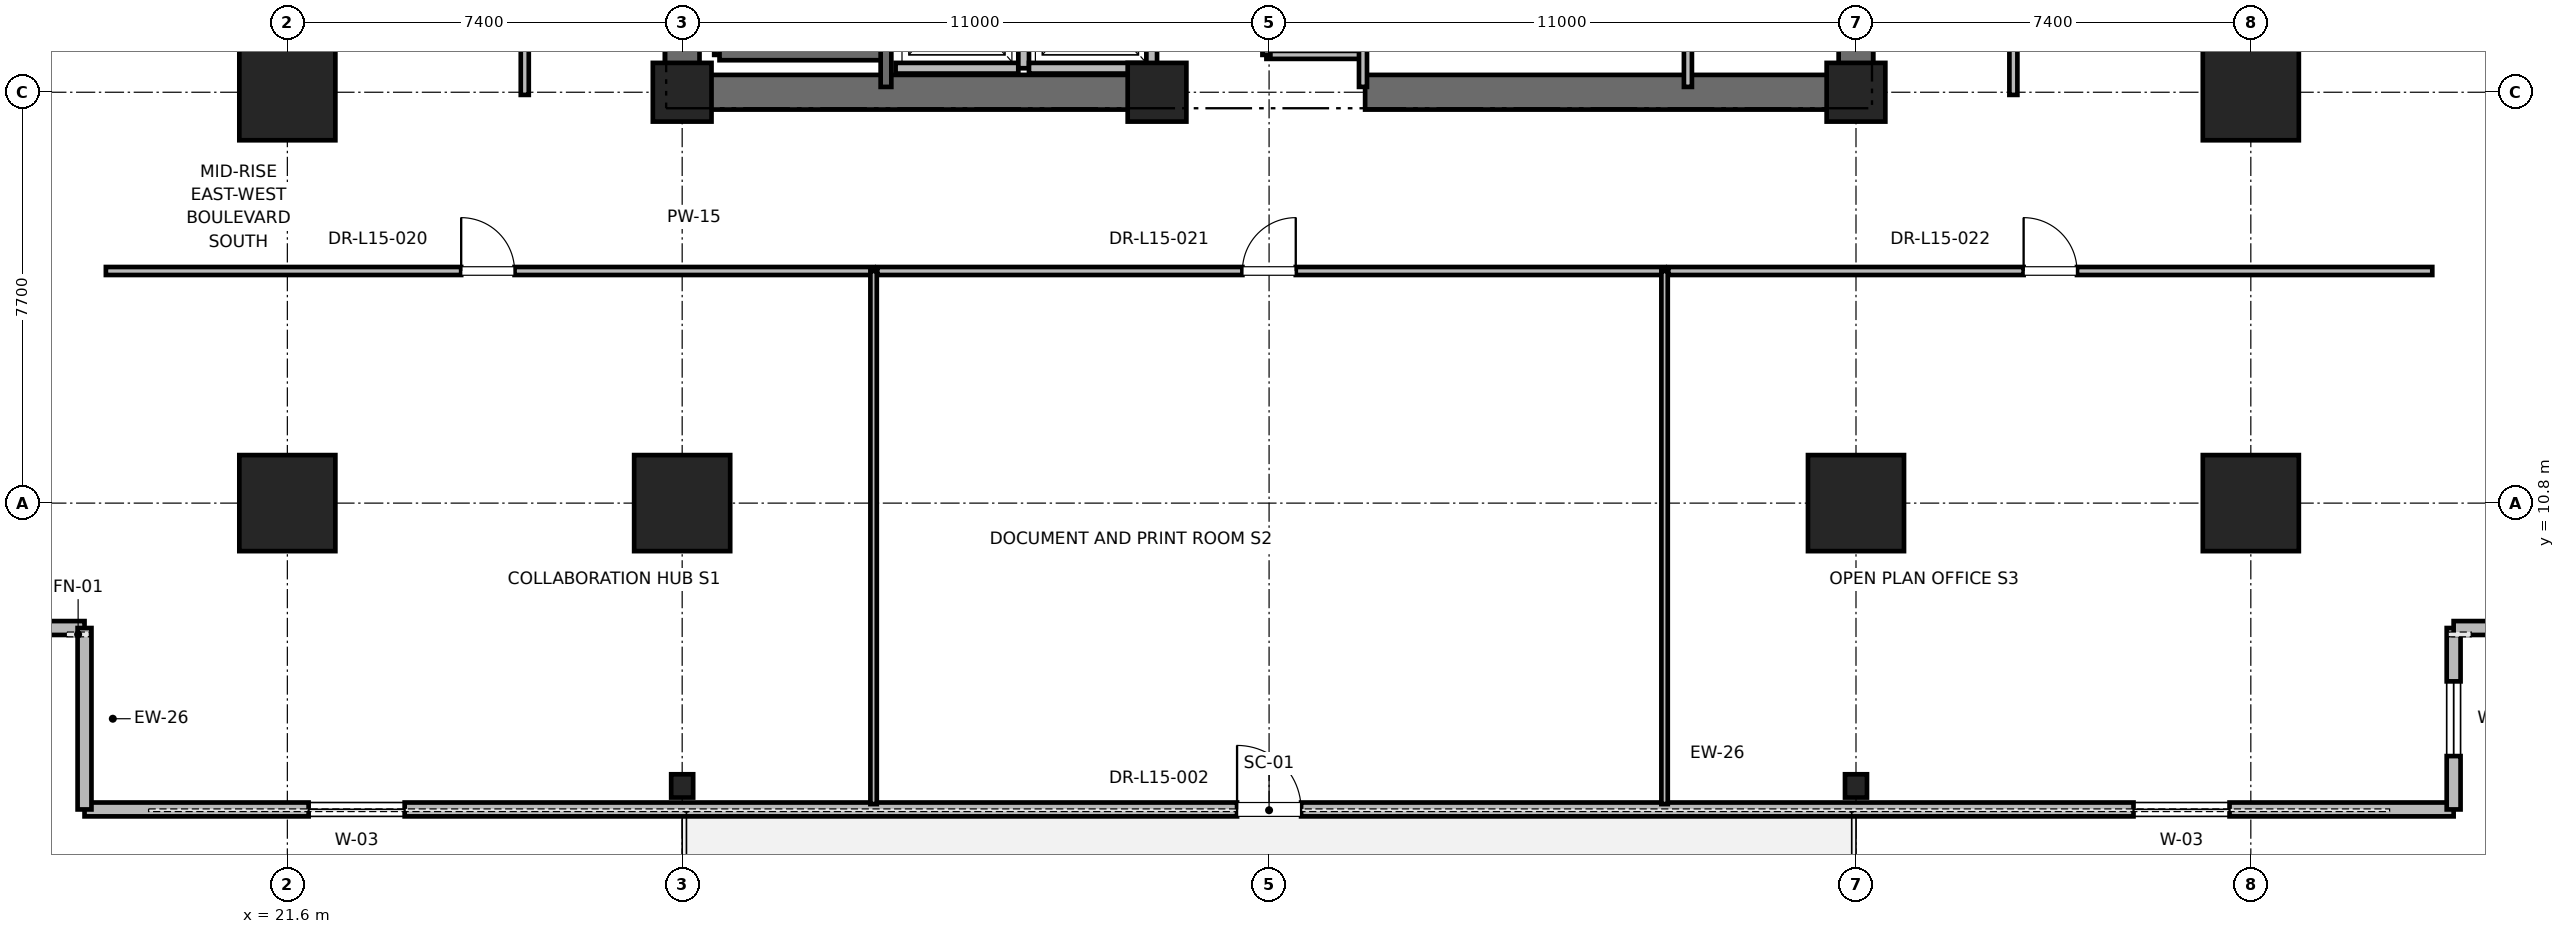
"""IFC4 building model, lengths in metres.
Left out: names, types, materials, properties, quantities, classifications, styles, units other than length and angle.
Written with IfcOpenShell. Run it as: python <this file> out.ifc"""

import sys

from ifc_helpers import new_model, si_unit, direction, frame, frame_2d, origin, origin_2d, place, context, subcontext, project, spatial, rectangle, i_section, extrude, element, fill, save


model = new_model("IFC4")
c1 = context("Model", 3, precision=1e-05, world=origin(), true_north=direction((0.0, 1.0)))
c2 = subcontext(c1, "Body", "Model", "MODEL_VIEW")
j1 = project(units=[si_unit("LENGTHUNIT", "METRE"), si_unit("PLANEANGLEUNIT", "RADIAN")], contexts=[c1])
p1 = place(None, origin())
s1 = spatial("IfcSite", under=j1, at=p1, CompositionType="ELEMENT")
p2 = place(p1, origin())
s2 = spatial("IfcBuilding", under=s1, at=p2, CompositionType="ELEMENT")
p3 = place(p2, frame((0.0, 0.0, 67.6)))
s3 = spatial("IfcBuildingStorey", under=s2, at=p3, CompositionType="ELEMENT", Elevation=67.6)
for number, where, z_axis, x_axis in (
    (1, (29.0, 10.8, 0.0), (0.0, 0.0, 1.0), (1.0, 0.0, 0.0)),
    (2, (51.0, 10.8, 0.0), (0.0, 0.0, 1.0), (1.0, 0.0, 0.0)),
    (3, (21.6, 18.5, 0.0), (0.0, 0.0, 1.0), (1.0, 0.0, 0.0)),
    (4, (58.4, 18.5, 0.0), (0.0, 0.0, 1.0), (1.0, 0.0, 0.0)),
    (5, (21.6, 10.8, 0.0), (0.0, 0.0, 1.0), (1.0, 0.0, 0.0)),
    (6, (58.4, 10.8, 0.0), (0.0, 0.0, 1.0), (1.0, 0.0, 0.0)),
):
    element("IfcColumn", number, at=place(p3, frame(where, z_axis=z_axis, x_axis=x_axis)), inside=s3, PredefinedType="COLUMN", context=c2, shape_type="SweptSolid", body=[
        extrude(rectangle(XDim=1.8, YDim=1.8, at=origin_2d()), origin(), (0.0, 0.0, 1.0), 4.0),
    ])
for number, where, z_axis, x_axis in (
    (7, (29.0, 5.5, 0.0), (0.0, 0.0, 1.0), (1.0, 0.0, 0.0)),
    (8, (51.0, 5.5, 0.0), (0.0, 0.0, 1.0), (1.0, 0.0, 0.0)),
):
    element("IfcColumn", number, at=place(p3, frame(where, z_axis=z_axis, x_axis=x_axis)), inside=s3, PredefinedType="COLUMN", context=c2, shape_type="SweptSolid", body=[
        extrude(i_section(OverallWidth=0.412, OverallDepth=0.437, WebThickness=0.036, FlangeThickness=0.058, FilletRadius=0.015, at=origin_2d()), origin(), (0.0, 0.0, 1.0), 4.0),
    ])
for number, where, z_axis, x_axis in (
    (9, (29.0, 18.5, 0.0), (0.0, 0.0, 1.0), (1.0, 0.0, 0.0)),
    (10, (51.0, 18.5, 0.0), (0.0, 0.0, 1.0), (1.0, 0.0, 0.0)),
    (11, (37.9, 18.5, 0.0), (0.0, 0.0, 1.0), (1.0, 0.0, 0.0)),
):
    element("IfcColumn", number, at=place(p3, frame(where, z_axis=z_axis, x_axis=x_axis)), inside=s3, PredefinedType="PILASTER", context=c2, shape_type="SweptSolid", body=[
        extrude(rectangle(XDim=1.1, YDim=1.1, at=origin_2d()), origin(), (0.0, 0.0, 1.0), 4.0),
    ])
for number, where, z_axis, x_axis in (
    (12, (29.0, 18.5, 0.0), (0.0, 0.0, 1.0), (1.0, 0.0, 0.0)),
    (13, (41.8, 18.5, 0.0), (0.0, 0.0, 1.0), (1.0, 0.0, 0.0)),
):
    element("IfcWall", number, at=place(p3, frame(where, z_axis=z_axis, x_axis=x_axis)), inside=s3, PredefinedType="SHEAR", context=c2, shape_type="SweptSolid", body=[
        extrude(rectangle(XDim=9.2, YDim=0.65, at=frame_2d((4.6, 0.0))), origin(), (0.0, 0.0, 1.0), 3.76),
    ])
p4 = place(p3, frame((29.0, 18.5, 0.0), z_axis=(0.0, 0.0, 1.0), x_axis=(0.0, 1.0, 0.0)))
e14 = element("IfcWall", 14, at=p4, inside=s3, PredefinedType="SHEAR", context=c2, shape_type="SweptSolid", body=[
    extrude(rectangle(XDim=8.8, YDim=0.65, at=frame_2d((4.4, 0.0))), origin(), (0.0, 0.0, 1.0), 3.76),
])
p5 = place(p3, frame((51.0, 18.5, 0.0), z_axis=(0.0, 0.0, 1.0), x_axis=(0.0, 1.0, 0.0)))
e15 = element("IfcWall", 15, at=p5, inside=s3, PredefinedType="SHEAR", context=c2, shape_type="SweptSolid", body=[
    extrude(rectangle(XDim=5.8, YDim=0.65, at=frame_2d((2.9, 0.0))), origin(), (0.0, 0.0, 1.0), 3.76),
])
p6 = place(p3, frame((17.799, 5.059, 0.0), z_axis=(0.0, 0.0, 1.0), x_axis=(1.0, 0.0, 0.0)))
e16 = element("IfcWall", 16, at=p6, inside=s3, PredefinedType="PARAPET", context=c2, shape_type="SweptSolid", body=[
    extrude(rectangle(XDim=44.402, YDim=0.26, at=frame_2d((22.201, 0.0))), origin(), (0.0, 0.0, 1.0), 2.889),
])
p7 = place(p6, frame((4.2, 0.0, 0.85)))
e17 = element("IfcOpeningElement", 17, at=p7, cuts=e16, PredefinedType="OPENING", context=c2, shape_type="SweptSolid", body=[
    extrude(rectangle(XDim=1.8, YDim=2.2, at=frame_2d((0.9, 1.1))), frame((0.0, 0.13, 0.0), z_axis=(0.0, -1.0, 0.0), x_axis=(1.0, 0.0, 0.0)), (0.0, 0.0, 1.0), 0.26),
])
p8 = place(p6, frame((21.601, 0.0, 0.0)))
e18 = element("IfcOpeningElement", 18, at=p8, cuts=e16, PredefinedType="OPENING", context=c2, shape_type="SweptSolid", body=[
    extrude(rectangle(XDim=1.2, YDim=2.2, at=frame_2d((0.6, 1.1))), frame((0.0, 0.13, 0.0), z_axis=(0.0, -1.0, 0.0), x_axis=(1.0, 0.0, 0.0)), (0.0, 0.0, 1.0), 0.26),
])
p9 = place(p6, frame((38.402, 0.0, 0.85)))
e19 = element("IfcOpeningElement", 19, at=p9, cuts=e16, PredefinedType="OPENING", context=c2, shape_type="SweptSolid", body=[
    extrude(rectangle(XDim=1.8, YDim=2.2, at=frame_2d((0.9, 1.1))), frame((0.0, 0.13, 0.0), z_axis=(0.0, -1.0, 0.0), x_axis=(1.0, 0.0, 0.0)), (0.0, 0.0, 1.0), 0.26),
])
p10 = place(p3, frame((13.999, 8.459, 0.0), z_axis=(0.0, 0.0, 1.0), x_axis=(1.0, 0.0, 0.0)))
e20 = element("IfcWall", 20, at=p10, inside=s3, PredefinedType="PARAPET", context=c2, shape_type="SweptSolid", body=[
    extrude(rectangle(XDim=3.8, YDim=0.26, at=frame_2d((1.9, 0.0))), origin(), (0.0, 0.0, 1.0), 3.76),
])
p11 = place(p10, frame((1.2, 0.0, 0.85)))
e21 = element("IfcOpeningElement", 21, at=p11, cuts=e20, PredefinedType="OPENING", context=c2, shape_type="SweptSolid", body=[
    extrude(rectangle(XDim=1.4, YDim=2.0, at=frame_2d((0.7, 1.0))), frame((0.0, 0.13, 0.0), z_axis=(0.0, -1.0, 0.0), x_axis=(1.0, 0.0, 0.0)), (0.0, 0.0, 1.0), 0.26),
])
p12 = place(p3, frame((17.799, 8.459, 0.0), z_axis=(0.0, 0.0, 1.0), x_axis=(0.0, -1.0, 0.0)))
e22 = element("IfcWall", 22, at=p12, inside=s3, PredefinedType="PARAPET", context=c2, shape_type="SweptSolid", body=[
    extrude(rectangle(XDim=3.4, YDim=0.26, at=frame_2d((1.7, 0.0))), origin(), (0.0, 0.0, 1.0), 3.76),
])
p13 = place(p3, frame((62.201, 5.059, 0.0), z_axis=(0.0, 0.0, 1.0), x_axis=(0.0, 1.0, 0.0)))
e23 = element("IfcWall", 23, at=p13, inside=s3, PredefinedType="PARAPET", context=c2, shape_type="SweptSolid", body=[
    extrude(rectangle(XDim=3.4, YDim=0.26, at=frame_2d((1.7, 0.0))), origin(), (0.0, 0.0, 1.0), 3.76),
])
p14 = place(p13, frame((1.0, 0.0, 0.85)))
e24 = element("IfcOpeningElement", 24, at=p14, cuts=e23, PredefinedType="OPENING", context=c2, shape_type="SweptSolid", body=[
    extrude(rectangle(XDim=1.4, YDim=2.0, at=frame_2d((0.7, 1.0))), frame((0.0, 0.13, 0.0), z_axis=(0.0, -1.0, 0.0), x_axis=(1.0, 0.0, 0.0)), (0.0, 0.0, 1.0), 0.26),
])
p15 = place(p3, frame((62.201, 8.459, 0.0), z_axis=(0.0, 0.0, 1.0), x_axis=(1.0, 0.0, 0.0)))
e25 = element("IfcWall", 25, at=p15, inside=s3, PredefinedType="PARAPET", context=c2, shape_type="SweptSolid", body=[
    extrude(rectangle(XDim=3.8, YDim=0.26, at=frame_2d((1.9, 0.0))), origin(), (0.0, 0.0, 1.0), 3.76),
])
p16 = place(p3, frame((29.7, 19.2, 0.0), z_axis=(0.0, 0.0, 1.0), x_axis=(0.0, 1.0, 0.0)))
e26 = element("IfcWall", 26, at=p16, inside=s3, PredefinedType="SOLIDWALL", context=c2, shape_type="SweptSolid", body=[
    extrude(rectangle(XDim=8.15, YDim=0.2, at=frame_2d((4.075, 0.0))), origin(), (0.0, 0.0, 1.0), 3.76),
])
p17 = place(p3, frame((29.7, 19.2, 0.0), z_axis=(0.0, 0.0, 1.0), x_axis=(1.0, 0.0, 0.0)))
e27 = element("IfcWall", 27, at=p17, inside=s3, PredefinedType="SOLIDWALL", context=c2, shape_type="SweptSolid", body=[
    extrude(rectangle(XDim=3.12, YDim=0.2, at=frame_2d((1.56, 0.0))), origin(), (0.0, 0.0, 1.0), 3.76),
])
p18 = place(p3, frame((32.82, 18.6, 0.0), z_axis=(0.0, 0.0, 1.0), x_axis=(0.0, 1.0, 0.0)))
e28 = element("IfcWall", 28, at=p18, inside=s3, PredefinedType="SOLIDWALL", context=c2, shape_type="SweptSolid", body=[
    extrude(rectangle(XDim=8.78, YDim=0.2, at=frame_2d((4.39, 0.0))), origin(), (0.0, 0.0, 1.0), 3.76),
])
p19 = place(p3, frame((33.0, 18.95, 0.0), z_axis=(0.0, 0.0, 1.0), x_axis=(1.0, 0.0, 0.0)))
e29 = element("IfcWall", 29, at=p19, inside=s3, PredefinedType="SOLIDWALL", context=c2, shape_type="SweptSolid", body=[
    extrude(rectangle(XDim=2.3, YDim=0.2, at=frame_2d((1.15, 0.0))), origin(), (0.0, 0.0, 1.0), 3.76),
])
p20 = place(p3, frame((35.4, 18.95, 0.0), z_axis=(0.0, 0.0, 1.0), x_axis=(0.0, 1.0, 0.0)))
e30 = element("IfcWall", 30, at=p20, inside=s3, PredefinedType="SOLIDWALL", context=c2, shape_type="SweptSolid", body=[
    extrude(rectangle(XDim=2.6, YDim=0.2, at=frame_2d((1.3, 0.0))), origin(), (0.0, 0.0, 1.0), 3.76),
])
p21 = place(p3, frame((35.5, 18.95, 0.0), z_axis=(0.0, 0.0, 1.0), x_axis=(1.0, 0.0, 0.0)))
e31 = element("IfcWall", 31, at=p21, inside=s3, PredefinedType="SOLIDWALL", context=c2, shape_type="SweptSolid", body=[
    extrude(rectangle(XDim=2.3, YDim=0.2, at=frame_2d((1.15, 0.0))), origin(), (0.0, 0.0, 1.0), 2.54),
])
p22 = place(p3, frame((37.8, 18.95, 0.0), z_axis=(0.0, 0.0, 1.0), x_axis=(0.0, 1.0, 0.0)))
e32 = element("IfcWall", 32, at=p22, inside=s3, PredefinedType="SOLIDWALL", context=c2, shape_type="SweptSolid", body=[
    extrude(rectangle(XDim=2.6, YDim=0.2, at=frame_2d((1.3, 0.0))), origin(), (0.0, 0.0, 1.0), 2.54),
])
p23 = place(p3, frame((39.95, 19.2, 0.0), z_axis=(0.0, 0.0, 1.0), x_axis=(1.0, 0.0, 0.0)))
e33 = element("IfcWall", 33, at=p23, inside=s3, PredefinedType="PARTITIONING", context=c2, shape_type="SweptSolid", body=[
    extrude(rectangle(XDim=1.81, YDim=0.15, at=frame_2d((0.905, 0.0))), origin(), (0.0, 0.0, 1.0), 2.85),
])
p24 = place(p3, frame((41.76, 18.6, 0.0), z_axis=(0.0, 0.0, 1.0), x_axis=(0.0, 1.0, 0.0)))
e34 = element("IfcWall", 34, at=p24, inside=s3, PredefinedType="PARTITIONING", context=c2, shape_type="SweptSolid", body=[
    extrude(rectangle(XDim=3.6, YDim=0.15, at=frame_2d((1.8, 0.0))), origin(), (0.0, 0.0, 1.0), 2.54),
])
p25 = place(p3, frame((39.95, 19.2, 0.0), z_axis=(0.0, 0.0, 1.0), x_axis=(0.0, 1.0, 0.0)))
e35 = element("IfcWall", 35, at=p25, inside=s3, PredefinedType="PARTITIONING", context=c2, shape_type="SweptSolid", body=[
    extrude(rectangle(XDim=3.0, YDim=0.15, at=frame_2d((1.5, 0.0))), origin(), (0.0, 0.0, 1.0), 2.85),
])
p26 = place(p25, frame((1.05, 0.0, 0.0)))
e36 = element("IfcOpeningElement", 36, at=p26, cuts=e35, PredefinedType="OPENING", context=c2, shape_type="SweptSolid", body=[
    extrude(rectangle(XDim=0.9, YDim=2.1, at=frame_2d((0.45, 1.05))), frame((0.0, 0.075, 0.0), z_axis=(0.0, -1.0, 0.0), x_axis=(1.0, 0.0, 0.0)), (0.0, 0.0, 1.0), 0.15),
])
p27 = place(p3, frame((47.85, 18.6, 0.0), z_axis=(0.0, 0.0, 1.0), x_axis=(0.0, 1.0, 0.0)))
e37 = element("IfcWall", 37, at=p27, inside=s3, PredefinedType="PARTITIONING", context=c2, shape_type="SweptSolid", body=[
    extrude(rectangle(XDim=2.54, YDim=0.15, at=frame_2d((1.27, 0.0))), origin(), (0.0, 0.0, 1.0), 2.85),
])
p28 = place(p3, frame((18.199, 15.15, 0.0), z_axis=(0.0, 0.0, 1.0), x_axis=(1.0, 0.0, 0.0)))
e38 = element("IfcWall", 38, at=p28, inside=s3, PredefinedType="PARTITIONING", context=c2, shape_type="SweptSolid", body=[
    extrude(rectangle(XDim=14.389, YDim=0.15, at=frame_2d((7.194, 0.0))), origin(), (0.0, 0.0, 1.0), 2.85),
])
p29 = place(p28, frame((6.659, 0.0, 0.0)))
e39 = element("IfcOpeningElement", 39, at=p29, cuts=e38, PredefinedType="OPENING", context=c2, shape_type="SweptSolid", body=[
    extrude(rectangle(XDim=1.0, YDim=2.15, at=frame_2d((0.5, 1.075))), frame((0.0, 0.075, 0.0), z_axis=(0.0, -1.0, 0.0), x_axis=(1.0, 0.0, 0.0)), (0.0, 0.0, 1.0), 0.15),
])
p30 = place(p3, frame((32.588, 5.159, 0.0), z_axis=(0.0, 0.0, 1.0), x_axis=(0.0, 1.0, 0.0)))
e40 = element("IfcWall", 40, at=p30, inside=s3, PredefinedType="PARTITIONING", context=c2, shape_type="SweptSolid", body=[
    extrude(rectangle(XDim=9.991, YDim=0.12, at=frame_2d((4.995, 0.0))), origin(), (0.0, 0.0, 1.0), 2.39),
])
p31 = place(p3, frame((32.658, 15.15, 0.0), z_axis=(0.0, 0.0, 1.0), x_axis=(1.0, 0.0, 0.0)))
e41 = element("IfcWall", 41, at=p31, inside=s3, PredefinedType="PARTITIONING", context=c2, shape_type="SweptSolid", body=[
    extrude(rectangle(XDim=14.755, YDim=0.15, at=frame_2d((7.377, 0.0))), origin(), (0.0, 0.0, 1.0), 2.85),
])
p32 = place(p31, frame((6.842, 0.0, 0.0)))
e42 = element("IfcOpeningElement", 42, at=p32, cuts=e41, PredefinedType="OPENING", context=c2, shape_type="SweptSolid", body=[
    extrude(rectangle(XDim=1.0, YDim=2.15, at=frame_2d((0.5, 1.075))), frame((0.0, 0.075, 0.0), z_axis=(0.0, -1.0, 0.0), x_axis=(1.0, 0.0, 0.0)), (0.0, 0.0, 1.0), 0.15),
])
p33 = place(p3, frame((47.412, 5.159, 0.0), z_axis=(0.0, 0.0, 1.0), x_axis=(0.0, 1.0, 0.0)))
e43 = element("IfcWall", 43, at=p33, inside=s3, PredefinedType="PARTITIONING", context=c2, shape_type="SweptSolid", body=[
    extrude(rectangle(XDim=9.991, YDim=0.12, at=frame_2d((4.995, 0.0))), origin(), (0.0, 0.0, 1.0), 2.39),
])
p34 = place(p3, frame((47.482, 15.15, 0.0), z_axis=(0.0, 0.0, 1.0), x_axis=(1.0, 0.0, 0.0)))
e44 = element("IfcWall", 44, at=p34, inside=s3, PredefinedType="PARTITIONING", context=c2, shape_type="SweptSolid", body=[
    extrude(rectangle(XDim=14.319, YDim=0.15, at=frame_2d((7.159, 0.0))), origin(), (0.0, 0.0, 1.0), 2.85),
])
p35 = place(p34, frame((6.659, 0.0, 0.0)))
e45 = element("IfcOpeningElement", 45, at=p35, cuts=e44, PredefinedType="OPENING", context=c2, shape_type="SweptSolid", body=[
    extrude(rectangle(XDim=1.0, YDim=2.15, at=frame_2d((0.5, 1.075))), frame((0.0, 0.075, 0.0), z_axis=(0.0, -1.0, 0.0), x_axis=(1.0, 0.0, 0.0)), (0.0, 0.0, 1.0), 0.15),
])
p36 = place(p3, frame((26.05, 18.45, 0.0), z_axis=(0.0, 0.0, 1.0), x_axis=(0.0, 1.0, 0.0)))
e46 = element("IfcWall", 46, at=p36, inside=s3, PredefinedType="PARTITIONING", context=c2, shape_type="SweptSolid", body=[
    extrude(rectangle(XDim=7.602, YDim=0.15, at=frame_2d((3.801, 0.0))), origin(), (0.0, 0.0, 1.0), 2.85),
])
p37 = place(p36, frame((3.316, 0.0, 0.0)))
e47 = element("IfcOpeningElement", 47, at=p37, cuts=e46, PredefinedType="OPENING", context=c2, shape_type="SweptSolid", body=[
    extrude(rectangle(XDim=1.05, YDim=2.2, at=frame_2d((0.525, 1.1))), frame((0.0, 0.075, 0.0), z_axis=(0.0, -1.0, 0.0), x_axis=(1.0, 0.0, 0.0)), (0.0, 0.0, 1.0), 0.15),
])
p38 = place(p3, frame((53.95, 18.45, 0.0), z_axis=(0.0, 0.0, 1.0), x_axis=(0.0, 1.0, 0.0)))
e48 = element("IfcWall", 48, at=p38, inside=s3, PredefinedType="PARTITIONING", context=c2, shape_type="SweptSolid", body=[
    extrude(rectangle(XDim=10.498, YDim=0.15, at=frame_2d((5.249, 0.0))), origin(), (0.0, 0.0, 1.0), 2.85),
])
p39 = place(p38, frame((4.789, 0.0, 0.0)))
e49 = element("IfcOpeningElement", 49, at=p39, cuts=e48, PredefinedType="OPENING", context=c2, shape_type="SweptSolid", body=[
    extrude(rectangle(XDim=1.0, YDim=2.15, at=frame_2d((0.5, 1.075))), frame((0.0, 0.075, 0.0), z_axis=(0.0, -1.0, 0.0), x_axis=(1.0, 0.0, 0.0)), (0.0, 0.0, 1.0), 0.15),
])
p40 = place(p7, origin())
e50 = element("IfcWindow", 50, at=p40, inside=s3, PartitioningType="SINGLE_PANEL", PredefinedType="WINDOW", context=c2, shape_type="SweptSolid", body=[
    extrude(rectangle(XDim=1.8, YDim=2.2, at=frame_2d((0.9, 1.1))), frame((0.0, 0.03, 0.0), z_axis=(0.0, -1.0, 0.0), x_axis=(1.0, 0.0, 0.0)), (0.0, 0.0, 1.0), 0.06),
])
fill(e17, e50)
p41 = place(p8, origin())
e51 = element("IfcDoor", 51, at=p41, inside=s3, OperationType="SINGLE_SWING_LEFT", PredefinedType="DOOR", context=c2, shape_type="SweptSolid", body=[
    extrude(rectangle(XDim=1.2, YDim=2.2, at=frame_2d((0.6, 1.1))), frame((0.0, 0.025, 0.0), z_axis=(0.0, -1.0, 0.0), x_axis=(1.0, 0.0, 0.0)), (0.0, 0.0, 1.0), 0.05),
])
fill(e18, e51)
p42 = place(p9, origin())
e52 = element("IfcWindow", 52, at=p42, inside=s3, PartitioningType="SINGLE_PANEL", PredefinedType="WINDOW", context=c2, shape_type="SweptSolid", body=[
    extrude(rectangle(XDim=1.8, YDim=2.2, at=frame_2d((0.9, 1.1))), frame((0.0, 0.03, 0.0), z_axis=(0.0, -1.0, 0.0), x_axis=(1.0, 0.0, 0.0)), (0.0, 0.0, 1.0), 0.06),
])
fill(e19, e52)
p43 = place(p14, origin())
e53 = element("IfcWindow", 53, at=p43, inside=s3, PartitioningType="SINGLE_PANEL", PredefinedType="WINDOW", context=c2, shape_type="SweptSolid", body=[
    extrude(rectangle(XDim=1.4, YDim=2.0, at=frame_2d((0.7, 1.0))), frame((0.0, 0.03, 0.0), z_axis=(0.0, -1.0, 0.0), x_axis=(1.0, 0.0, 0.0)), (0.0, 0.0, 1.0), 0.06),
])
fill(e24, e53)
p44 = place(p29, origin())
e54 = element("IfcDoor", 54, at=p44, inside=s3, OperationType="SINGLE_SWING_LEFT", PredefinedType="DOOR", context=c2, shape_type="SweptSolid", body=[
    extrude(rectangle(XDim=1.0, YDim=2.15, at=frame_2d((0.5, 1.075))), frame((0.0, 0.025, 0.0), z_axis=(0.0, -1.0, 0.0), x_axis=(1.0, 0.0, 0.0)), (0.0, 0.0, 1.0), 0.05),
])
fill(e39, e54)
p45 = place(p32, origin())
e55 = element("IfcDoor", 55, at=p45, inside=s3, OperationType="SINGLE_SWING_RIGHT", PredefinedType="DOOR", context=c2, shape_type="SweptSolid", body=[
    extrude(rectangle(XDim=1.0, YDim=2.15, at=frame_2d((0.5, 1.075))), frame((0.0, 0.025, 0.0), z_axis=(0.0, -1.0, 0.0), x_axis=(1.0, 0.0, 0.0)), (0.0, 0.0, 1.0), 0.05),
])
fill(e42, e55)
p46 = place(p35, origin())
e56 = element("IfcDoor", 56, at=p46, inside=s3, OperationType="SINGLE_SWING_LEFT", PredefinedType="DOOR", context=c2, shape_type="SweptSolid", body=[
    extrude(rectangle(XDim=1.0, YDim=2.15, at=frame_2d((0.5, 1.075))), frame((0.0, 0.025, 0.0), z_axis=(0.0, -1.0, 0.0), x_axis=(1.0, 0.0, 0.0)), (0.0, 0.0, 1.0), 0.05),
])
fill(e45, e56)
save(model, sys.argv[1])
